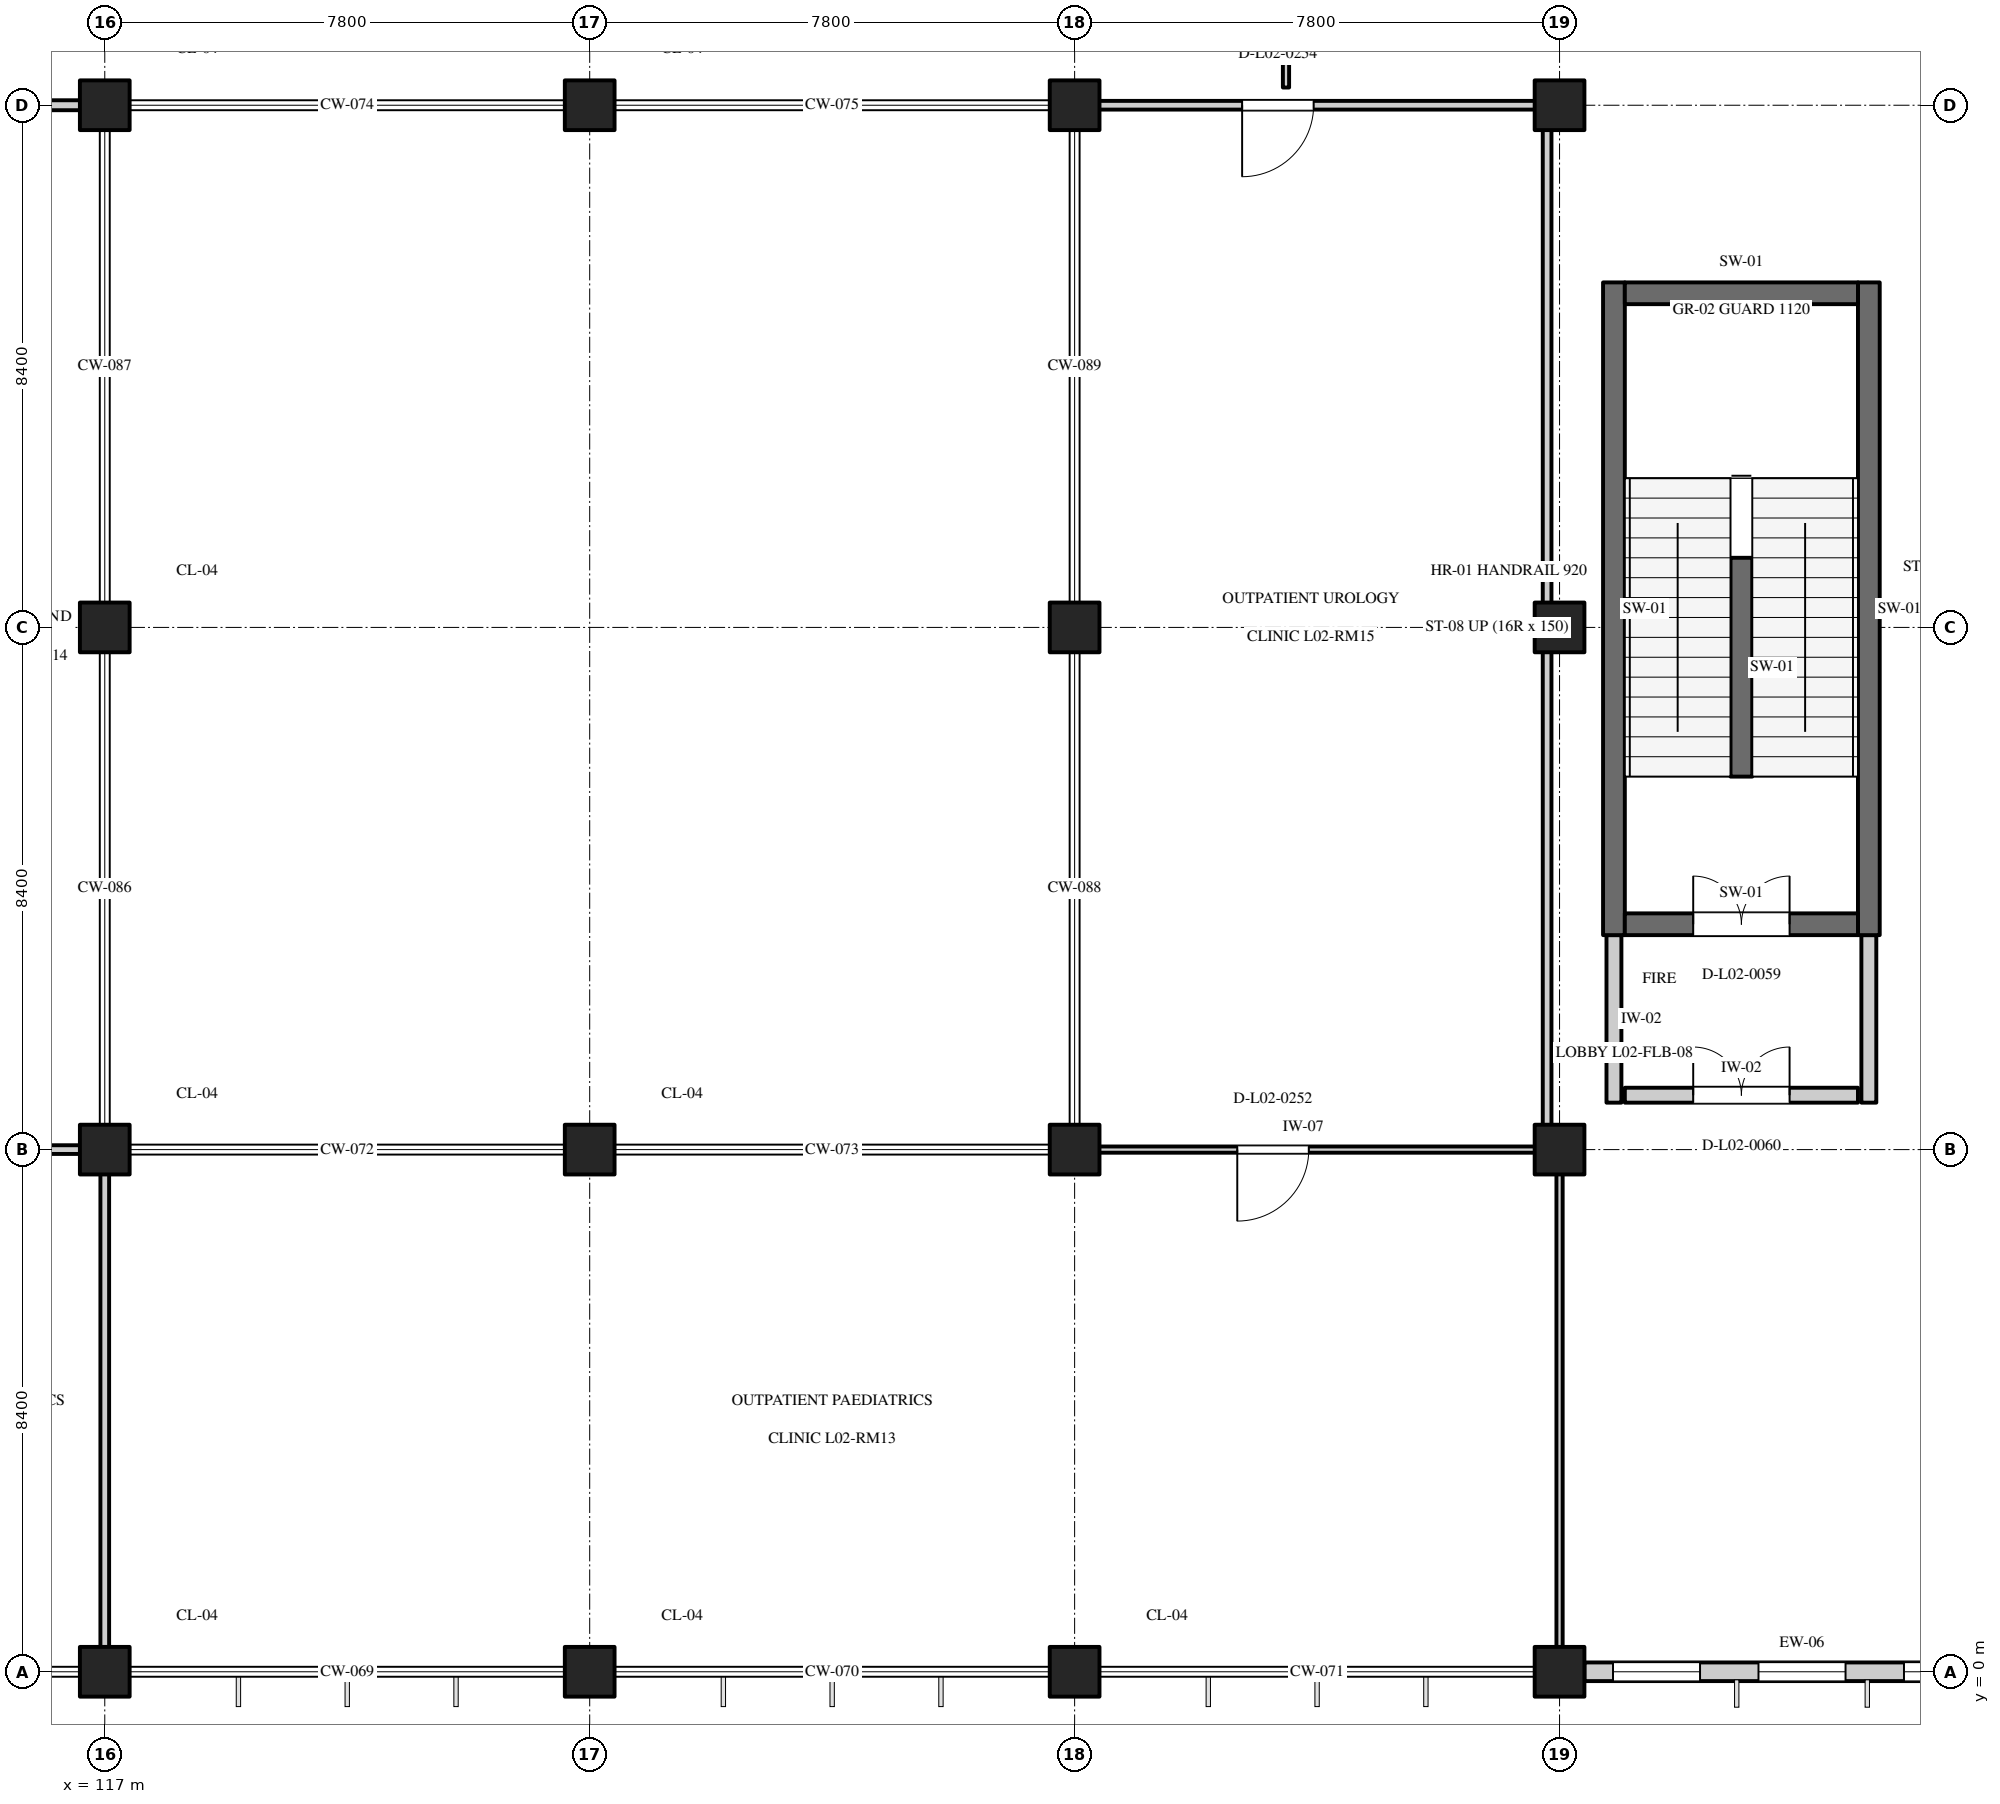
"""IFC4 building model, lengths in metres.
Left out: names, types, materials, properties, quantities, classifications, styles, units other than length and angle.
Written with IfcOpenShell. Run it as: python <this file> out.ifc"""

import sys

from ifc_helpers import new_model, si_unit, direction, frame, frame_2d, origin, origin_2d, place, context, subcontext, project, spatial, rectangle, extrude, element, fill, save


model = new_model("IFC4")
c1 = context("Model", 3, precision=1e-05, world=origin(), true_north=direction((0.0, 1.0)))
c2 = subcontext(c1, "Body", "Model", "MODEL_VIEW")
j1 = project(units=[si_unit("LENGTHUNIT", "METRE"), si_unit("PLANEANGLEUNIT", "RADIAN")], contexts=[c1])
p1 = place(None, origin())
s1 = spatial("IfcSite", under=j1, at=p1, CompositionType="ELEMENT")
p2 = place(p1, origin())
s2 = spatial("IfcBuilding", under=s1, at=p2, CompositionType="ELEMENT")
p3 = place(p2, frame((0.0, 0.0, 9.6)))
s3 = spatial("IfcBuildingStorey", under=s2, at=p3, CompositionType="ELEMENT", Elevation=9.6)
for number, where, z_axis, x_axis in (
    (1, (117.0, 0.0, 0.0), (0.0, 0.0, 1.0), (1.0, 0.0, 0.0)),
    (2, (117.0, 8.4, 0.0), (0.0, 0.0, 1.0), (1.0, 0.0, 0.0)),
    (3, (117.0, 16.8, 0.0), (0.0, 0.0, 1.0), (1.0, 0.0, 0.0)),
    (4, (117.0, 25.2, 0.0), (0.0, 0.0, 1.0), (1.0, 0.0, 0.0)),
    (5, (124.8, 0.0, 0.0), (0.0, 0.0, 1.0), (1.0, 0.0, 0.0)),
    (6, (124.8, 8.4, 0.0), (0.0, 0.0, 1.0), (1.0, 0.0, 0.0)),
    (7, (124.8, 25.2, 0.0), (0.0, 0.0, 1.0), (1.0, 0.0, 0.0)),
    (8, (132.6, 0.0, 0.0), (0.0, 0.0, 1.0), (1.0, 0.0, 0.0)),
    (9, (132.6, 8.4, 0.0), (0.0, 0.0, 1.0), (1.0, 0.0, 0.0)),
    (10, (132.6, 16.8, 0.0), (0.0, 0.0, 1.0), (1.0, 0.0, 0.0)),
    (11, (132.6, 25.2, 0.0), (0.0, 0.0, 1.0), (1.0, 0.0, 0.0)),
    (12, (140.4, 0.0, 0.0), (0.0, 0.0, 1.0), (1.0, 0.0, 0.0)),
    (13, (140.4, 8.4, 0.0), (0.0, 0.0, 1.0), (1.0, 0.0, 0.0)),
    (14, (140.4, 16.8, 0.0), (0.0, 0.0, 1.0), (1.0, 0.0, 0.0)),
    (15, (140.4, 25.2, 0.0), (0.0, 0.0, 1.0), (1.0, 0.0, 0.0)),
):
    element("IfcColumn", number, at=place(p3, frame(where, z_axis=z_axis, x_axis=x_axis)), inside=s3, PredefinedType="COLUMN", context=c2, shape_type="SweptSolid", body=[
        extrude(rectangle(XDim=0.8, YDim=0.8, at=origin_2d()), origin(), (0.0, 0.0, 1.0), 4.8),
    ])
p4 = place(p3, frame((140.8, 0.0, 0.0), z_axis=(0.0, 0.0, 1.0), x_axis=(1.0, 0.0, 0.0)))
e16 = element("IfcWall", 16, at=p4, inside=s3, PredefinedType="STANDARD", context=c2, shape_type="SweptSolid", body=[
    extrude(rectangle(XDim=7.0, YDim=0.3, at=frame_2d((3.5, 0.0))), origin(), (0.0, 0.0, 1.0), 3.8),
])
p5 = place(p4, frame((0.46, 0.0, 0.75)))
e17 = element("IfcOpeningElement", 17, at=p5, cuts=e16, PredefinedType="OPENING", context=c2, shape_type="SweptSolid", body=[
    extrude(rectangle(XDim=1.4, YDim=1.45, at=frame_2d((0.7, 0.725))), frame((0.0, 0.162, 0.0), z_axis=(0.0, -1.0, 0.0), x_axis=(1.0, 0.0, 0.0)), (0.0, 0.0, 1.0), 0.324),
])
p6 = place(p4, frame((2.8, 0.0, 0.75)))
e18 = element("IfcOpeningElement", 18, at=p6, cuts=e16, PredefinedType="OPENING", context=c2, shape_type="SweptSolid", body=[
    extrude(rectangle(XDim=1.4, YDim=1.45, at=frame_2d((0.7, 0.725))), frame((0.0, 0.162, 0.0), z_axis=(0.0, -1.0, 0.0), x_axis=(1.0, 0.0, 0.0)), (0.0, 0.0, 1.0), 0.324),
])
p7 = place(p4, frame((5.14, 0.0, 0.75)))
e19 = element("IfcOpeningElement", 19, at=p7, cuts=e16, PredefinedType="OPENING", context=c2, shape_type="SweptSolid", body=[
    extrude(rectangle(XDim=1.4, YDim=1.45, at=frame_2d((0.7, 0.725))), frame((0.0, 0.162, 0.0), z_axis=(0.0, -1.0, 0.0), x_axis=(1.0, 0.0, 0.0)), (0.0, 0.0, 1.0), 0.324),
])
for number, where, z_axis, x_axis in (
    (20, (141.275, 11.85, 0.0), (0.0, 0.0, 1.0), (0.0, 1.0, 0.0)),
    (21, (145.375, 11.85, 0.0), (0.0, 0.0, 1.0), (0.0, 1.0, 0.0)),
):
    element("IfcWall", number, at=place(p3, frame(where, z_axis=z_axis, x_axis=x_axis)), inside=s3, PredefinedType="SHEAR", context=c2, shape_type="SweptSolid", body=[
        extrude(rectangle(XDim=10.5, YDim=0.35, at=frame_2d((5.25, 0.0))), origin(), (0.0, 0.0, 1.0), 4.8),
    ])
p8 = place(p3, frame((141.45, 22.175, 0.0), z_axis=(0.0, 0.0, 1.0), x_axis=(1.0, 0.0, 0.0)))
e22 = element("IfcWall", 22, at=p8, inside=s3, PredefinedType="SHEAR", context=c2, shape_type="SweptSolid", body=[
    extrude(rectangle(XDim=3.75, YDim=0.35, at=frame_2d((1.875, 0.0))), origin(), (0.0, 0.0, 1.0), 4.8),
])
p9 = place(p3, frame((141.45, 12.025, 0.0), z_axis=(0.0, 0.0, 1.0), x_axis=(1.0, 0.0, 0.0)))
e23 = element("IfcWall", 23, at=p9, inside=s3, PredefinedType="SHEAR", context=c2, shape_type="SweptSolid", body=[
    extrude(rectangle(XDim=3.75, YDim=0.35, at=frame_2d((1.875, 0.0))), origin(), (0.0, 0.0, 1.0), 4.5),
])
p10 = place(p9, frame((1.1, 0.0, 0.0)))
e24 = element("IfcOpeningElement", 24, at=p10, cuts=e23, PredefinedType="OPENING", context=c2, shape_type="SweptSolid", body=[
    extrude(rectangle(XDim=1.55, YDim=2.25, at=frame_2d((0.775, 1.125))), frame((0.0, 0.187, 0.0), z_axis=(0.0, -1.0, 0.0), x_axis=(1.0, 0.0, 0.0)), (0.0, 0.0, 1.0), 0.374),
])
for number, where, z_axis, x_axis in (
    (25, (141.275, 9.155, 0.0), (0.0, 0.0, 1.0), (0.0, 1.0, 0.0)),
    (26, (145.375, 9.155, 0.0), (0.0, 0.0, 1.0), (0.0, 1.0, 0.0)),
):
    element("IfcWall", number, at=place(p3, frame(where, z_axis=z_axis, x_axis=x_axis)), inside=s3, PredefinedType="STANDARD", context=c2, shape_type="SweptSolid", body=[
        extrude(rectangle(XDim=2.695, YDim=0.24, at=frame_2d((1.348, 0.0))), origin(), (0.0, 0.0, 1.0), 4.5),
    ])
p11 = place(p3, frame((141.45, 9.275, 0.0), z_axis=(0.0, 0.0, 1.0), x_axis=(1.0, 0.0, 0.0)))
e27 = element("IfcWall", 27, at=p11, inside=s3, PredefinedType="STANDARD", context=c2, shape_type="SweptSolid", body=[
    extrude(rectangle(XDim=3.75, YDim=0.24, at=frame_2d((1.875, 0.0))), origin(), (0.0, 0.0, 1.0), 4.5),
])
p12 = place(p11, frame((1.1, 0.0, 0.0)))
e28 = element("IfcOpeningElement", 28, at=p12, cuts=e27, PredefinedType="OPENING", context=c2, shape_type="SweptSolid", body=[
    extrude(rectangle(XDim=1.55, YDim=2.25, at=frame_2d((0.775, 1.125))), frame((0.0, 0.132, 0.0), z_axis=(0.0, -1.0, 0.0), x_axis=(1.0, 0.0, 0.0)), (0.0, 0.0, 1.0), 0.264),
])
p13 = place(p3, frame((143.325, 14.4, 0.0), z_axis=(0.0, 0.0, 1.0), x_axis=(0.0, 1.0, 0.0)))
e29 = element("IfcWall", 29, at=p13, inside=s3, PredefinedType="SHEAR", context=c2, shape_type="SweptSolid", body=[
    extrude(rectangle(XDim=3.52, YDim=0.35, at=frame_2d((1.76, 0.0))), origin(), (0.0, 0.0, 1.0), 4.8),
])
p14 = place(p3, frame((101.485, 8.4, 0.0), z_axis=(0.0, 0.0, 1.0), x_axis=(1.0, 0.0, 0.0)))
e30 = element("IfcWall", 30, at=p14, inside=s3, PredefinedType="PARTITIONING", context=c2, shape_type="SweptSolid", body=[
    extrude(rectangle(XDim=15.43, YDim=0.14, at=frame_2d((7.715, 0.0))), origin(), (0.0, 0.0, 1.0), 4.48),
])
p15 = place(p14, frame((1.958, 0.0, 0.0)))
e31 = element("IfcOpeningElement", 31, at=p15, cuts=e30, PredefinedType="OPENING", context=c2, shape_type="SweptSolid", body=[
    extrude(rectangle(XDim=1.95, YDim=2.35, at=frame_2d((0.975, 1.175))), frame((0.0, 0.082, 0.0), z_axis=(0.0, -1.0, 0.0), x_axis=(1.0, 0.0, 0.0)), (0.0, 0.0, 1.0), 0.164),
])
p16 = place(p3, frame((117.0, 0.085, 0.0), z_axis=(0.0, 0.0, 1.0), x_axis=(0.0, 1.0, 0.0)))
e32 = element("IfcWall", 32, at=p16, inside=s3, PredefinedType="PARTITIONING", context=c2, shape_type="SweptSolid", body=[
    extrude(rectangle(XDim=8.23, YDim=0.14, at=frame_2d((4.115, 0.0))), origin(), (0.0, 0.0, 1.0), 3.75),
])
p17 = place(p3, frame((124.44, 8.4, 0.0), z_axis=(0.0, 0.0, 1.0), x_axis=(1.0, 0.0, 0.0)))
e33 = element("IfcWall", 33, at=p17, inside=s3, PredefinedType="PARTITIONING", context=c2, shape_type="SweptSolid", body=[
    extrude(rectangle(XDim=0.72, YDim=0.1, at=frame_2d((0.36, 0.0))), origin(), (0.0, 0.0, 1.0), 4.48),
])
p18 = place(p3, frame((132.24, 8.4, 0.0), z_axis=(0.0, 0.0, 1.0), x_axis=(1.0, 0.0, 0.0)))
e34 = element("IfcWall", 34, at=p18, inside=s3, PredefinedType="PARTITIONING", context=c2, shape_type="SweptSolid", body=[
    extrude(rectangle(XDim=8.075, YDim=0.1, at=frame_2d((4.038, 0.0))), origin(), (0.0, 0.0, 1.0), 4.48),
])
p19 = place(p18, frame((2.976, 0.0, 0.0)))
e35 = element("IfcOpeningElement", 35, at=p19, cuts=e34, PredefinedType="OPENING", context=c2, shape_type="SweptSolid", body=[
    extrude(rectangle(XDim=1.15, YDim=2.15, at=frame_2d((0.575, 1.075))), frame((0.0, 0.062, 0.0), z_axis=(0.0, -1.0, 0.0), x_axis=(1.0, 0.0, 0.0)), (0.0, 0.0, 1.0), 0.124),
])
for number, where, z_axis, x_axis in (
    (36, (124.44, 0.0, 0.0), (0.0, 0.0, 1.0), (1.0, 0.0, 0.0)),
    (37, (132.24, 0.0, 0.0), (0.0, 0.0, 1.0), (1.0, 0.0, 0.0)),
):
    element("IfcWall", number, at=place(p3, frame(where, z_axis=z_axis, x_axis=x_axis)), inside=s3, PredefinedType="PARTITIONING", context=c2, shape_type="SweptSolid", body=[
        extrude(rectangle(XDim=0.72, YDim=0.1, at=frame_2d((0.36, 0.0))), origin(), (0.0, 0.0, 1.0), 3.75),
    ])
p20 = place(p3, frame((140.4, 0.085, 0.0), z_axis=(0.0, 0.0, 1.0), x_axis=(0.0, 1.0, 0.0)))
e38 = element("IfcWall", 38, at=p20, inside=s3, PredefinedType="PARTITIONING", context=c2, shape_type="SweptSolid", body=[
    extrude(rectangle(XDim=8.23, YDim=0.1, at=frame_2d((4.115, 0.0))), origin(), (0.0, 0.0, 1.0), 4.48),
])
p21 = place(p3, frame((101.485, 25.2, 0.0), z_axis=(0.0, 0.0, 1.0), x_axis=(1.0, 0.0, 0.0)))
e39 = element("IfcWall", 39, at=p21, inside=s3, PredefinedType="PARTITIONING", context=c2, shape_type="SweptSolid", body=[
    extrude(rectangle(XDim=15.43, YDim=0.16, at=frame_2d((7.715, 0.0))), origin(), (0.0, 0.0, 1.0), 3.75),
])
p22 = place(p21, frame((2.662, 0.0, 0.0)))
e40 = element("IfcOpeningElement", 40, at=p22, cuts=e39, PredefinedType="OPENING", context=c2, shape_type="SweptSolid", body=[
    extrude(rectangle(XDim=1.15, YDim=2.15, at=frame_2d((0.575, 1.075))), frame((0.0, 0.092, 0.0), z_axis=(0.0, -1.0, 0.0), x_axis=(1.0, 0.0, 0.0)), (0.0, 0.0, 1.0), 0.184),
])
p23 = place(p3, frame((117.0, 16.44, 0.0), z_axis=(0.0, 0.0, 1.0), x_axis=(0.0, 1.0, 0.0)))
e41 = element("IfcWall", 41, at=p23, inside=s3, PredefinedType="PARTITIONING", context=c2, shape_type="SweptSolid", body=[
    extrude(rectangle(XDim=0.72, YDim=0.16, at=frame_2d((0.36, 0.0))), origin(), (0.0, 0.0, 1.0), 3.75),
])
p24 = place(p3, frame((132.685, 25.2, 0.0), z_axis=(0.0, 0.0, 1.0), x_axis=(1.0, 0.0, 0.0)))
e42 = element("IfcWall", 42, at=p24, inside=s3, PredefinedType="PARTITIONING", context=c2, shape_type="SweptSolid", body=[
    extrude(rectangle(XDim=7.43, YDim=0.14, at=frame_2d((3.715, 0.0))), origin(), (0.0, 0.0, 1.0), 3.75),
])
p25 = place(p24, frame((2.609, 0.0, 0.0)))
e43 = element("IfcOpeningElement", 43, at=p25, cuts=e42, PredefinedType="OPENING", context=c2, shape_type="SweptSolid", body=[
    extrude(rectangle(XDim=1.15, YDim=2.15, at=frame_2d((0.575, 1.075))), frame((0.0, 0.082, 0.0), z_axis=(0.0, -1.0, 0.0), x_axis=(1.0, 0.0, 0.0)), (0.0, 0.0, 1.0), 0.164),
])
p26 = place(p3, frame((132.6, 16.44, 0.0), z_axis=(0.0, 0.0, 1.0), x_axis=(0.0, 1.0, 0.0)))
e44 = element("IfcWall", 44, at=p26, inside=s3, PredefinedType="PARTITIONING", context=c2, shape_type="SweptSolid", body=[
    extrude(rectangle(XDim=0.72, YDim=0.14, at=frame_2d((0.36, 0.0))), origin(), (0.0, 0.0, 1.0), 3.75),
])
p27 = place(p3, frame((140.2, 8.485, 0.0), z_axis=(0.0, 0.0, 1.0), x_axis=(0.0, 1.0, 0.0)))
e45 = element("IfcWall", 45, at=p27, inside=s3, PredefinedType="PARTITIONING", context=c2, shape_type="SweptSolid", body=[
    extrude(rectangle(XDim=16.63, YDim=0.14, at=frame_2d((8.315, 0.0))), origin(), (0.0, 0.0, 1.0), 4.48),
])
p28 = place(p3, frame((116.955, 25.4, 0.0), z_axis=(0.0, 0.0, 1.0), x_axis=(1.0, 0.0, 0.0)))
e46 = element("IfcWall", 46, at=p28, inside=s3, PredefinedType="PARTITIONING", context=c2, shape_type="SweptSolid", body=[
    extrude(rectangle(XDim=0.405, YDim=0.1, at=frame_2d((0.203, 0.0))), origin(), (0.0, 0.0, 1.0), 3.75),
])
p29 = place(p3, frame((124.44, 25.4, 0.0), z_axis=(0.0, 0.0, 1.0), x_axis=(1.0, 0.0, 0.0)))
e47 = element("IfcWall", 47, at=p29, inside=s3, PredefinedType="PARTITIONING", context=c2, shape_type="SweptSolid", body=[
    extrude(rectangle(XDim=0.72, YDim=0.1, at=frame_2d((0.36, 0.0))), origin(), (0.0, 0.0, 1.0), 3.75),
])
p30 = place(p3, frame((132.24, 25.4, 0.0), z_axis=(0.0, 0.0, 1.0), x_axis=(1.0, 0.0, 0.0)))
e48 = element("IfcWall", 48, at=p30, inside=s3, PredefinedType="PARTITIONING", context=c2, shape_type="SweptSolid", body=[
    extrude(rectangle(XDim=0.405, YDim=0.1, at=frame_2d((0.203, 0.0))), origin(), (0.0, 0.0, 1.0), 3.75),
])
p31 = place(p3, frame((136.0, 25.485, 0.0), z_axis=(0.0, 0.0, 1.0), x_axis=(0.0, 1.0, 0.0)))
e49 = element("IfcWall", 49, at=p31, inside=s3, PredefinedType="PARTITIONING", context=c2, shape_type="SweptSolid", body=[
    extrude(rectangle(XDim=8.03, YDim=0.1, at=frame_2d((4.015, 0.0))), origin(), (0.0, 0.0, 1.0), 4.48),
])
p32 = place(p5, origin())
e50 = element("IfcWindow", 50, at=p32, inside=s3, PartitioningType="SINGLE_PANEL", PredefinedType="WINDOW", context=c2, shape_type="SweptSolid", body=[
    extrude(rectangle(XDim=1.4, YDim=1.45, at=frame_2d((0.7, 0.725))), frame((0.0, 0.03, 0.0), z_axis=(0.0, -1.0, 0.0), x_axis=(1.0, 0.0, 0.0)), (0.0, 0.0, 1.0), 0.06),
])
fill(e17, e50)
p33 = place(p6, origin())
e51 = element("IfcWindow", 51, at=p33, inside=s3, PartitioningType="SINGLE_PANEL", PredefinedType="WINDOW", context=c2, shape_type="SweptSolid", body=[
    extrude(rectangle(XDim=1.4, YDim=1.45, at=frame_2d((0.7, 0.725))), frame((0.0, 0.03, 0.0), z_axis=(0.0, -1.0, 0.0), x_axis=(1.0, 0.0, 0.0)), (0.0, 0.0, 1.0), 0.06),
])
fill(e18, e51)
p34 = place(p7, origin())
e52 = element("IfcWindow", 52, at=p34, inside=s3, PartitioningType="SINGLE_PANEL", PredefinedType="WINDOW", context=c2, shape_type="SweptSolid", body=[
    extrude(rectangle(XDim=1.4, YDim=1.45, at=frame_2d((0.7, 0.725))), frame((0.0, 0.03, 0.0), z_axis=(0.0, -1.0, 0.0), x_axis=(1.0, 0.0, 0.0)), (0.0, 0.0, 1.0), 0.06),
])
fill(e19, e52)
p35 = place(p10, origin())
e53 = element("IfcDoor", 53, at=p35, inside=s3, OperationType="DOUBLE_DOOR_SINGLE_SWING", PredefinedType="DOOR", context=c2, shape_type="SweptSolid", body=[
    extrude(rectangle(XDim=1.55, YDim=2.25, at=frame_2d((0.775, 1.125))), frame((0.0, 0.025, 0.0), z_axis=(0.0, -1.0, 0.0), x_axis=(1.0, 0.0, 0.0)), (0.0, 0.0, 1.0), 0.05),
])
fill(e24, e53)
p36 = place(p12, origin())
e54 = element("IfcDoor", 54, at=p36, inside=s3, OperationType="DOUBLE_DOOR_SINGLE_SWING", PredefinedType="DOOR", context=c2, shape_type="SweptSolid", body=[
    extrude(rectangle(XDim=1.55, YDim=2.25, at=frame_2d((0.775, 1.125))), frame((0.0, 0.025, 0.0), z_axis=(0.0, -1.0, 0.0), x_axis=(1.0, 0.0, 0.0)), (0.0, 0.0, 1.0), 0.05),
])
fill(e28, e54)
p37 = place(p19, frame((1.15, 0.0, 0.0), z_axis=(0.0, 0.0, 1.0), x_axis=(-1.0, 0.0, 0.0)))
e55 = element("IfcDoor", 55, at=p37, inside=s3, OperationType="SINGLE_SWING_RIGHT", PredefinedType="DOOR", context=c2, shape_type="SweptSolid", body=[
    extrude(rectangle(XDim=1.15, YDim=2.15, at=frame_2d((0.575, 1.075))), frame((0.0, 0.025, 0.0), z_axis=(0.0, -1.0, 0.0), x_axis=(1.0, 0.0, 0.0)), (0.0, 0.0, 1.0), 0.05),
])
fill(e35, e55)
p38 = place(p25, frame((1.15, 0.0, 0.0), z_axis=(0.0, 0.0, 1.0), x_axis=(-1.0, 0.0, 0.0)))
e56 = element("IfcDoor", 56, at=p38, inside=s3, OperationType="SINGLE_SWING_RIGHT", PredefinedType="DOOR", context=c2, shape_type="SweptSolid", body=[
    extrude(rectangle(XDim=1.15, YDim=2.15, at=frame_2d((0.575, 1.075))), frame((0.0, 0.025, 0.0), z_axis=(0.0, -1.0, 0.0), x_axis=(1.0, 0.0, 0.0)), (0.0, 0.0, 1.0), 0.05),
])
fill(e43, e56)
save(model, sys.argv[1])
